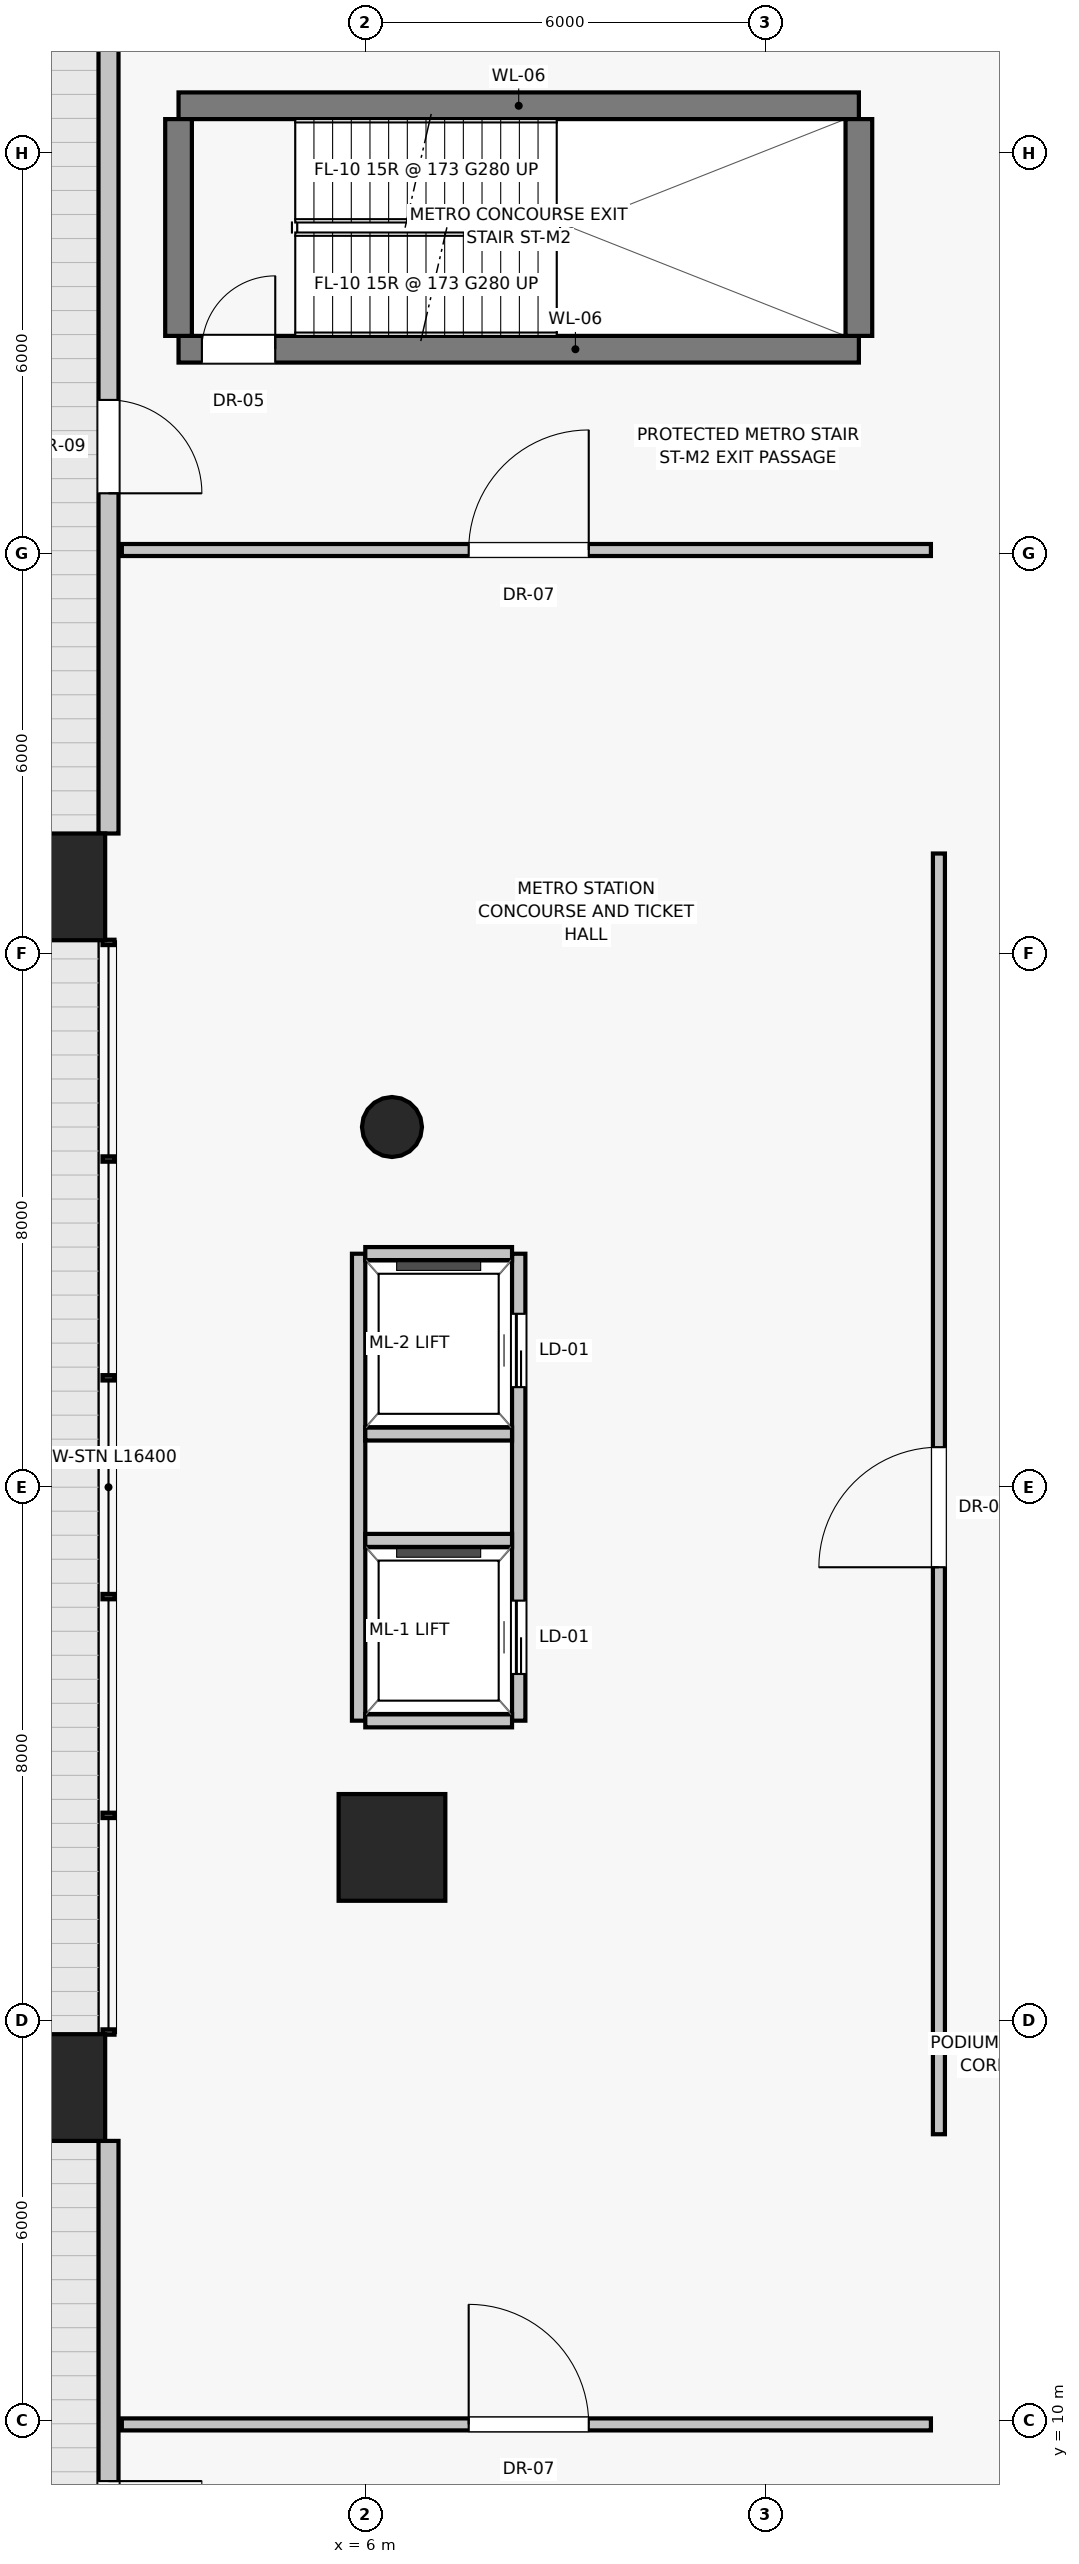
"""IFC4 building model, lengths in metres.
Left out: names, types, materials, properties, quantities, classifications, styles, units other than length and angle.
Written with IfcOpenShell. Run it as: python <this file> out.ifc"""

import sys

from ifc_helpers import new_model, si_unit, direction, frame, frame_2d, origin, origin_2d, place, context, subcontext, project, spatial, rectangle, circle, extrude, source, transform, mapped, element, fill, save


model = new_model("IFC4")
c1 = context("Model", 3, precision=1e-05, world=origin(), true_north=direction((0.0, 1.0)))
c2 = subcontext(c1, "Body", "Model", "MODEL_VIEW")
j1 = project(units=[si_unit("LENGTHUNIT", "METRE"), si_unit("PLANEANGLEUNIT", "RADIAN")], contexts=[c1])
p1 = place(None, origin())
s1 = spatial("IfcSite", under=j1, at=p1, CompositionType="ELEMENT")
p2 = place(p1, origin())
s2 = spatial("IfcBuilding", under=s1, at=p2, CompositionType="ELEMENT")
p3 = place(p2, origin())
s3 = spatial("IfcBuildingStorey", under=s2, at=p3, CompositionType="ELEMENT", Elevation=0.0)
for number, where, z_axis, x_axis in (
    (1, (1.3, 15.0, 0.0), (0.0, 0.0, 1.0), (1.0, 0.0, 0.0)),
    (2, (1.3, 33.0, 0.0), (0.0, 0.0, 1.0), (1.0, 0.0, 0.0)),
):
    element("IfcColumn", number, at=place(p3, frame(where, z_axis=z_axis, x_axis=x_axis)), inside=s3, PredefinedType="COLUMN", context=c2, shape_type="SweptSolid", body=[
        extrude(rectangle(XDim=1.6, YDim=1.6, at=origin_2d()), origin(), (0.0, 0.0, 1.0), 5.2),
    ])
p4 = place(p3, frame((6.4, 29.4, 0.0), z_axis=(0.0, 0.0, 1.0), x_axis=(1.0, 0.0, 0.0)))
e3 = element("IfcColumn", 3, at=p4, inside=s3, PredefinedType="COLUMN", context=c2, shape_type="SweptSolid", body=[
    extrude(circle(Radius=0.45, at=origin_2d()), origin(), (0.0, 0.0, 1.0), 5.2),
])
p5 = place(p3, frame((6.4, 18.6, 0.0), z_axis=(0.0, 0.0, 1.0), x_axis=(1.0, 0.0, 0.0)))
e4 = element("IfcColumn", 4, at=p5, inside=s3, PredefinedType="COLUMN", context=c2, shape_type="SweptSolid", body=[
    extrude(rectangle(XDim=1.6, YDim=1.6, at=origin_2d()), origin(), (0.0, 0.0, 1.0), 5.2),
])
p6 = place(p3, frame((2.15, 45.7, 0.0), z_axis=(0.0, 0.0, 1.0), x_axis=(0.0, -1.0, 0.0)))
e5 = element("IfcWall", 5, at=p6, inside=s3, PredefinedType="SOLIDWALL", context=c2, shape_type="SweptSolid", body=[
    extrude(rectangle(XDim=11.9, YDim=0.3, at=frame_2d((5.95, 0.0))), origin(), (0.0, 0.0, 1.0), 3.8),
])
p7 = place(p6, frame((5.4, 0.0, 0.0)))
e6 = element("IfcOpeningElement", 6, at=p7, cuts=e5, PredefinedType="OPENING", context=c2, shape_type="SweptSolid", body=[
    extrude(rectangle(XDim=1.4, YDim=2.3, at=frame_2d((0.7, 1.15))), frame((0.0, 0.16, 0.0), z_axis=(0.0, -1.0, 0.0), x_axis=(1.0, 0.0, 0.0)), (0.0, 0.0, 1.0), 0.32),
])
p8 = place(p3, frame((2.15, 14.2, 0.0), z_axis=(0.0, 0.0, 1.0), x_axis=(0.0, -1.0, 0.0)))
e7 = element("IfcWall", 7, at=p8, inside=s3, PredefinedType="SOLIDWALL", context=c2, shape_type="SweptSolid", body=[
    extrude(rectangle(XDim=11.9, YDim=0.3, at=frame_2d((5.95, 0.0))), origin(), (0.0, 0.0, 1.0), 3.8),
])
p9 = place(p8, frame((5.1, 0.0, 0.0)))
e8 = element("IfcOpeningElement", 8, at=p9, cuts=e7, PredefinedType="OPENING", context=c2, shape_type="SweptSolid", body=[
    extrude(rectangle(XDim=1.4, YDim=2.3, at=frame_2d((0.7, 1.15))), frame((0.0, 0.16, 0.0), z_axis=(0.0, -1.0, 0.0), x_axis=(1.0, 0.0, 0.0)), (0.0, 0.0, 1.0), 0.32),
])
p10 = place(p3, frame((3.2, 41.06, 0.0), z_axis=(0.0, 0.0, 1.0), x_axis=(1.0, 0.0, 0.0)))
e9 = element("IfcWall", 9, at=p10, inside=s3, PredefinedType="SHEAR", context=c2, shape_type="SweptSolid", body=[
    extrude(rectangle(XDim=10.2, YDim=0.4, at=frame_2d((5.1, 0.0))), origin(), (0.0, 0.0, 1.0), 4.9),
])
p11 = place(p10, frame((0.35, 0.0, 0.0)))
e10 = element("IfcOpeningElement", 10, at=p11, cuts=e9, PredefinedType="OPENING", context=c2, shape_type="SweptSolid", body=[
    extrude(rectangle(XDim=1.1, YDim=2.03, at=frame_2d((0.55, 1.015))), frame((0.0, 0.21, 0.0), z_axis=(0.0, -1.0, 0.0), x_axis=(1.0, 0.0, 0.0)), (0.0, 0.0, 1.0), 0.42),
])
p12 = place(p3, frame((3.2, 44.71, 0.0), z_axis=(0.0, 0.0, 1.0), x_axis=(1.0, 0.0, 0.0)))
e11 = element("IfcWall", 11, at=p12, inside=s3, PredefinedType="SHEAR", context=c2, shape_type="SweptSolid", body=[
    extrude(rectangle(XDim=10.2, YDim=0.4, at=frame_2d((5.1, 0.0))), origin(), (0.0, 0.0, 1.0), 4.9),
])
for number, where, z_axis, x_axis in (
    (12, (3.2, 41.26, 0.0), (0.0, 0.0, 1.0), (0.0, 1.0, 0.0)),
    (13, (13.4, 41.26, 0.0), (0.0, 0.0, 1.0), (0.0, 1.0, 0.0)),
):
    element("IfcWall", number, at=place(p3, frame(where, z_axis=z_axis, x_axis=x_axis)), inside=s3, PredefinedType="SHEAR", context=c2, shape_type="SweptSolid", body=[
        extrude(rectangle(XDim=3.25, YDim=0.4, at=frame_2d((1.625, 0.0))), origin(), (0.0, 0.0, 1.0), 4.9),
    ])
p13 = place(p3, frame((8.3, 20.5, 0.0), z_axis=(0.0, 0.0, 1.0), x_axis=(0.0, 1.0, 0.0)))
e14 = element("IfcWall", 14, at=p13, inside=s3, PredefinedType="SOLIDWALL", context=c2, shape_type="SweptSolid", body=[
    extrude(rectangle(XDim=7.0, YDim=0.2, at=frame_2d((3.5, 0.0))), origin(), (0.0, 0.0, 1.0), 4.9),
])
p14 = place(p13, frame((0.7, 0.0, 0.0)))
e15 = element("IfcOpeningElement", 15, at=p14, cuts=e14, PredefinedType="OPENING", context=c2, shape_type="SweptSolid", body=[
    extrude(rectangle(XDim=1.1, YDim=2.08, at=frame_2d((0.55, 1.04))), frame((0.0, 0.11, 0.0), z_axis=(0.0, -1.0, 0.0), x_axis=(1.0, 0.0, 0.0)), (0.0, 0.0, 1.0), 0.22),
])
p15 = place(p13, frame((5.0, 0.0, 0.0)))
e16 = element("IfcOpeningElement", 16, at=p15, cuts=e14, PredefinedType="OPENING", context=c2, shape_type="SweptSolid", body=[
    extrude(rectangle(XDim=1.1, YDim=2.08, at=frame_2d((0.55, 1.04))), frame((0.0, 0.11, 0.0), z_axis=(0.0, -1.0, 0.0), x_axis=(1.0, 0.0, 0.0)), (0.0, 0.0, 1.0), 0.22),
])
p16 = place(p3, frame((5.9, 20.5, 0.0), z_axis=(0.0, 0.0, 1.0), x_axis=(0.0, 1.0, 0.0)))
e17 = element("IfcWall", 17, at=p16, inside=s3, PredefinedType="SOLIDWALL", context=c2, shape_type="SweptSolid", body=[
    extrude(rectangle(XDim=7.0, YDim=0.2, at=frame_2d((3.5, 0.0))), origin(), (0.0, 0.0, 1.0), 4.032),
])
for number, where, z_axis, x_axis in (
    (18, (6.0, 20.5, 0.0), (0.0, 0.0, 1.0), (1.0, 0.0, 0.0)),
    (19, (6.0, 27.5, 0.0), (0.0, 0.0, 1.0), (1.0, 0.0, 0.0)),
    (20, (6.0, 23.2, 0.0), (0.0, 0.0, 1.0), (1.0, 0.0, 0.0)),
    (21, (6.0, 24.8, 0.0), (0.0, 0.0, 1.0), (1.0, 0.0, 0.0)),
):
    element("IfcWall", number, at=place(p3, frame(where, z_axis=z_axis, x_axis=x_axis)), inside=s3, PredefinedType="SOLIDWALL", context=c2, shape_type="SweptSolid", body=[
        extrude(rectangle(XDim=2.2, YDim=0.2, at=frame_2d((1.1, 0.0))), origin(), (0.0, 0.0, 1.0), 4.9),
    ])
p17 = place(p3, frame((2.35, 9.95, 0.0), z_axis=(0.0, 0.0, 1.0), x_axis=(1.0, 0.0, 0.0)))
e22 = element("IfcWall", 22, at=p17, inside=s3, PredefinedType="PARTITIONING", context=c2, shape_type="SweptSolid", body=[
    extrude(rectangle(XDim=12.13, YDim=0.18, at=frame_2d((6.065, 0.0))), origin(), (0.0, 0.0, 1.0), 4.9),
])
p18 = place(p17, frame((5.2, 0.0, 0.0)))
e23 = element("IfcOpeningElement", 23, at=p18, cuts=e22, PredefinedType="OPENING", context=c2, shape_type="SweptSolid", body=[
    extrude(rectangle(XDim=1.8, YDim=2.25, at=frame_2d((0.9, 1.125))), frame((0.0, 0.1, 0.0), z_axis=(0.0, -1.0, 0.0), x_axis=(1.0, 0.0, 0.0)), (0.0, 0.0, 1.0), 0.2),
])
p19 = place(p3, frame((2.35, 38.05, 0.0), z_axis=(0.0, 0.0, 1.0), x_axis=(1.0, 0.0, 0.0)))
e24 = element("IfcWall", 24, at=p19, inside=s3, PredefinedType="PARTITIONING", context=c2, shape_type="SweptSolid", body=[
    extrude(rectangle(XDim=12.13, YDim=0.18, at=frame_2d((6.065, 0.0))), origin(), (0.0, 0.0, 1.0), 4.9),
])
p20 = place(p19, frame((5.2, 0.0, 0.0)))
e25 = element("IfcOpeningElement", 25, at=p20, cuts=e24, PredefinedType="OPENING", context=c2, shape_type="SweptSolid", body=[
    extrude(rectangle(XDim=1.8, YDim=2.25, at=frame_2d((0.9, 1.125))), frame((0.0, 0.1, 0.0), z_axis=(0.0, -1.0, 0.0), x_axis=(1.0, 0.0, 0.0)), (0.0, 0.0, 1.0), 0.2),
])
p21 = place(p3, frame((14.6, 14.3, 0.0), z_axis=(0.0, 0.0, 1.0), x_axis=(0.0, 1.0, 0.0)))
e26 = element("IfcWall", 26, at=p21, inside=s3, PredefinedType="PARTITIONING", context=c2, shape_type="SweptSolid", body=[
    extrude(rectangle(XDim=19.2, YDim=0.18, at=frame_2d((9.6, 0.0))), origin(), (0.0, 0.0, 1.0), 4.9),
])
p22 = place(p21, frame((8.5, 0.0, 0.0)))
e27 = element("IfcOpeningElement", 27, at=p22, cuts=e26, PredefinedType="OPENING", context=c2, shape_type="SweptSolid", body=[
    extrude(rectangle(XDim=1.8, YDim=2.25, at=frame_2d((0.9, 1.125))), frame((0.0, 0.1, 0.0), z_axis=(0.0, -1.0, 0.0), x_axis=(1.0, 0.0, 0.0)), (0.0, 0.0, 1.0), 0.2),
])
m1 = source(origin(), c2, "Body", "SweptSolid", [
    extrude(rectangle(XDim=1.4, YDim=2.3, at=frame_2d((0.7, 1.15))), frame((0.0, 0.025, 0.0), z_axis=(0.0, -1.0, 0.0), x_axis=(1.0, 0.0, 0.0)), (0.0, 0.0, 1.0), 0.05),
])
p23 = place(p7, frame((1.4, 0.0, 0.0), z_axis=(0.0, 0.0, 1.0), x_axis=(-1.0, 0.0, 0.0)))
e28 = element("IfcDoor", 28, at=p23, inside=s3, OperationType="SINGLE_SWING_RIGHT", PredefinedType="DOOR", context=c2, shape_type="MappedRepresentation", body=[
    mapped(m1, transform((0.0, 0.0, 0.0), scale=1.0)),
])
fill(e6, e28)
p24 = place(p9, frame((1.4, 0.0, 0.0), z_axis=(0.0, 0.0, 1.0), x_axis=(-1.0, 0.0, 0.0)))
e29 = element("IfcDoor", 29, at=p24, inside=s3, OperationType="SINGLE_SWING_LEFT", PredefinedType="DOOR", context=c2, shape_type="MappedRepresentation", body=[
    mapped(m1, transform((0.0, 0.0, 0.0), scale=1.0)),
])
fill(e8, e29)
m2 = source(origin(), c2, "Body", "SweptSolid", [
    extrude(rectangle(XDim=1.1, YDim=2.03, at=frame_2d((0.55, 1.015))), frame((0.0, 0.025, 0.0), z_axis=(0.0, -1.0, 0.0), x_axis=(1.0, 0.0, 0.0)), (0.0, 0.0, 1.0), 0.05),
])
p25 = place(p11, origin())
e30 = element("IfcDoor", 30, at=p25, inside=s3, OperationType="SINGLE_SWING_RIGHT", PredefinedType="DOOR", context=c2, shape_type="MappedRepresentation", body=[
    mapped(m2, transform((0.0, 0.0, 0.0), scale=1.0)),
])
fill(e10, e30)
m3 = source(origin(), c2, "Body", "SweptSolid", [
    extrude(rectangle(XDim=1.1, YDim=2.08, at=frame_2d((0.55, 1.04))), frame((0.0, 0.025, 0.0), z_axis=(0.0, -1.0, 0.0), x_axis=(1.0, 0.0, 0.0)), (0.0, 0.0, 1.0), 0.05),
])
p26 = place(p14, origin())
e31 = element("IfcDoor", 31, at=p26, inside=s3, OperationType="SLIDING_TO_LEFT", PredefinedType="DOOR", context=c2, shape_type="MappedRepresentation", body=[
    mapped(m3, transform((0.0, 0.0, 0.0), scale=1.0)),
])
fill(e15, e31)
p27 = place(p15, origin())
e32 = element("IfcDoor", 32, at=p27, inside=s3, OperationType="SLIDING_TO_LEFT", PredefinedType="DOOR", context=c2, shape_type="MappedRepresentation", body=[
    mapped(m3, transform((0.0, 0.0, 0.0), scale=1.0)),
])
fill(e16, e32)
m4 = source(origin(), c2, "Body", "SweptSolid", [
    extrude(rectangle(XDim=1.8, YDim=2.25, at=frame_2d((0.9, 1.125))), frame((0.0, 0.025, 0.0), z_axis=(0.0, -1.0, 0.0), x_axis=(1.0, 0.0, 0.0)), (0.0, 0.0, 1.0), 0.05),
])
p28 = place(p18, origin())
e33 = element("IfcDoor", 33, at=p28, inside=s3, OperationType="SINGLE_SWING_LEFT", PredefinedType="DOOR", context=c2, shape_type="MappedRepresentation", body=[
    mapped(m4, transform((0.0, 0.0, 0.0), scale=1.0)),
])
fill(e23, e33)
p29 = place(p20, origin())
e34 = element("IfcDoor", 34, at=p29, inside=s3, OperationType="SINGLE_SWING_RIGHT", PredefinedType="DOOR", context=c2, shape_type="MappedRepresentation", body=[
    mapped(m4, transform((0.0, 0.0, 0.0), scale=1.0)),
])
fill(e25, e34)
p30 = place(p22, origin())
e35 = element("IfcDoor", 35, at=p30, inside=s3, OperationType="SINGLE_SWING_LEFT", PredefinedType="DOOR", context=c2, shape_type="MappedRepresentation", body=[
    mapped(m4, transform((0.0, 0.0, 0.0), scale=1.0)),
])
fill(e27, e35)
save(model, sys.argv[1])
